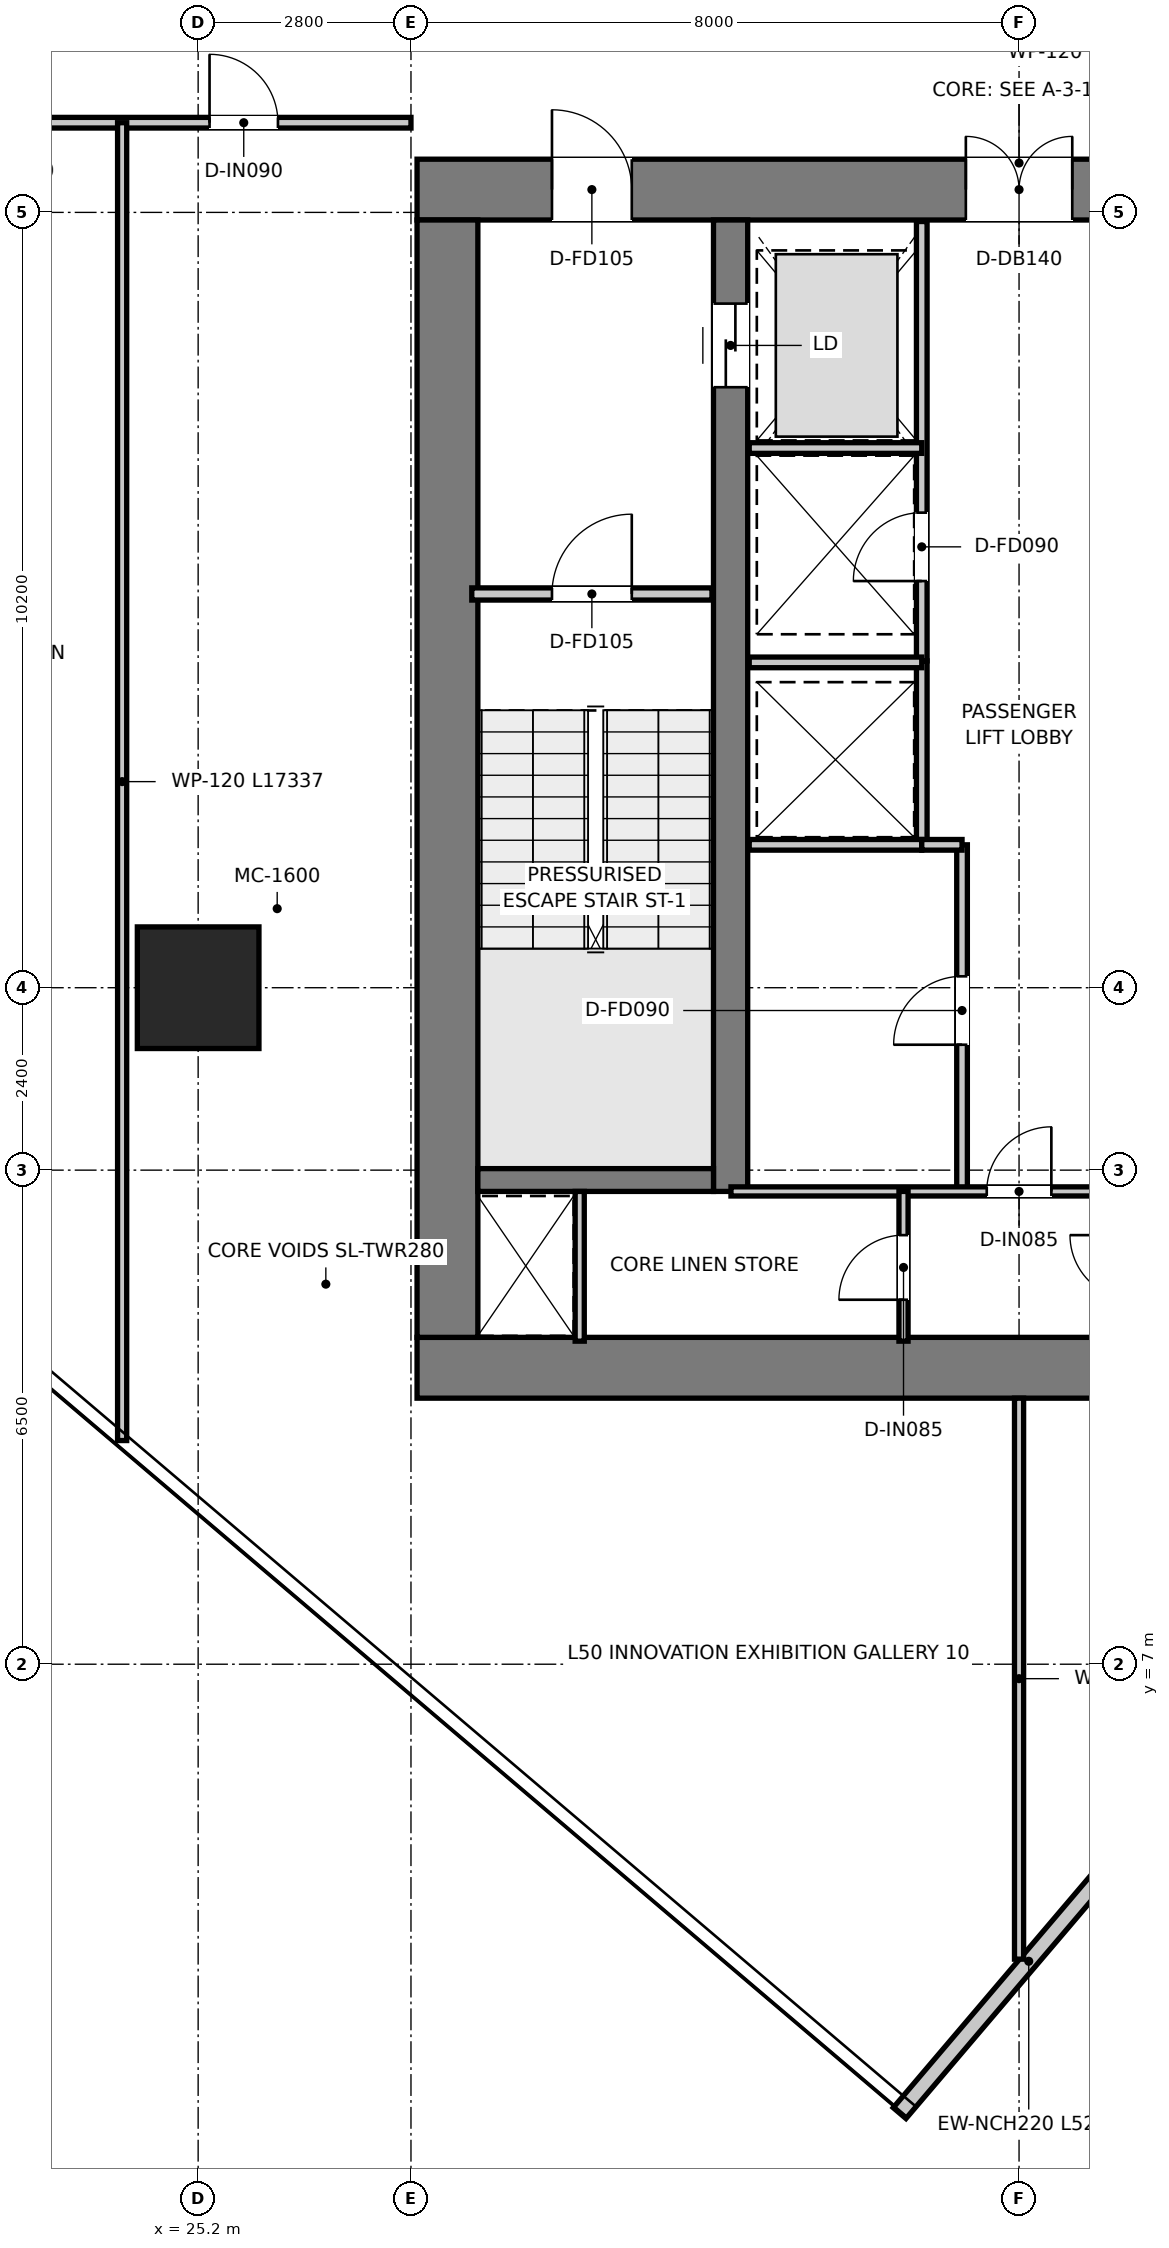
"""IFC4 building model, lengths in metres.
Left out: names, types, materials, properties, quantities, classifications, styles, units other than length and angle.
Written with IfcOpenShell. Run it as: python <this file> out.ifc"""

import sys

from ifc_helpers import new_model, si_unit, direction, frame, frame_2d, origin, origin_2d, place, context, subcontext, project, spatial, rectangle, extrude, source, transform, mapped, element, fill, save


model = new_model("IFC4")
c1 = context("Model", 3, precision=1e-05, world=origin(), true_north=direction((0.0, 1.0)))
c2 = subcontext(c1, "Body", "Model", "MODEL_VIEW")
j1 = project(units=[si_unit("LENGTHUNIT", "METRE"), si_unit("PLANEANGLEUNIT", "RADIAN")], contexts=[c1])
p1 = place(None, origin())
s1 = spatial("IfcSite", under=j1, at=p1, CompositionType="ELEMENT")
p2 = place(p1, origin())
s2 = spatial("IfcBuilding", under=s1, at=p2, CompositionType="ELEMENT")
p3 = place(p2, frame((0.0, 0.0, 207.3)))
s3 = spatial("IfcBuildingStorey", under=s2, at=p3, CompositionType="ELEMENT", Elevation=207.3)
p4 = place(p3, frame((28.08, 10.9, 0.0), z_axis=(0.0, 0.0, 1.0), x_axis=(1.0, 0.0, 0.0)))
e1 = element("IfcWall", 1, at=p4, inside=s3, PredefinedType="SHEAR", context=c2, shape_type="SweptSolid", body=[
    extrude(rectangle(XDim=15.84, YDim=0.8, at=frame_2d((7.92, 0.0))), origin(), (0.0, 0.0, 1.0), 3.95),
])
p5 = place(p3, frame((28.08, 26.4, 0.0), z_axis=(0.0, 0.0, 1.0), x_axis=(1.0, 0.0, 0.0)))
e2 = element("IfcWall", 2, at=p5, inside=s3, PredefinedType="SHEAR", context=c2, shape_type="SweptSolid", body=[
    extrude(rectangle(XDim=15.84, YDim=0.8, at=frame_2d((7.92, 0.0))), origin(), (0.0, 0.0, 1.0), 3.95),
])
p6 = place(p5, frame((7.22, 0.0, 0.0)))
e3 = element("IfcOpeningElement", 3, at=p6, cuts=e2, PredefinedType="OPENING", context=c2, shape_type="SweptSolid", body=[
    extrude(rectangle(XDim=1.4, YDim=2.2, at=frame_2d((0.7, 1.1))), frame((0.0, 0.41, 0.0), z_axis=(0.0, -1.0, 0.0), x_axis=(1.0, 0.0, 0.0)), (0.0, 0.0, 1.0), 0.82),
])
p7 = place(p5, frame((1.775, 0.0, 0.0)))
e4 = element("IfcOpeningElement", 4, at=p7, cuts=e2, PredefinedType="OPENING", context=c2, shape_type="SweptSolid", body=[
    extrude(rectangle(XDim=1.05, YDim=2.1, at=frame_2d((0.525, 1.05))), frame((0.0, 0.41, 0.0), z_axis=(0.0, -1.0, 0.0), x_axis=(1.0, 0.0, 0.0)), (0.0, 0.0, 1.0), 0.82),
])
p8 = place(p5, frame((13.015, 0.0, 0.0)))
e5 = element("IfcOpeningElement", 5, at=p8, cuts=e2, PredefinedType="OPENING", context=c2, shape_type="SweptSolid", body=[
    extrude(rectangle(XDim=1.05, YDim=2.1, at=frame_2d((0.525, 1.05))), frame((0.0, 0.41, 0.0), z_axis=(0.0, -1.0, 0.0), x_axis=(1.0, 0.0, 0.0)), (0.0, 0.0, 1.0), 0.82),
])
p9 = place(p3, frame((28.48, 11.3, 0.0), z_axis=(0.0, 0.0, 1.0), x_axis=(0.0, 1.0, 0.0)))
e6 = element("IfcWall", 6, at=p9, inside=s3, PredefinedType="SHEAR", context=c2, shape_type="SweptSolid", body=[
    extrude(rectangle(XDim=14.7, YDim=0.8, at=frame_2d((7.35, 0.0))), origin(), (0.0, 0.0, 1.0), 3.95),
])
p10 = place(p3, frame((32.205, 13.22, 0.0), z_axis=(0.0, 0.0, 1.0), x_axis=(0.0, 1.0, 0.0)))
e7 = element("IfcWall", 7, at=p10, inside=s3, PredefinedType="SHEAR", context=c2, shape_type="SweptSolid", body=[
    extrude(rectangle(XDim=12.78, YDim=0.45, at=frame_2d((6.39, 0.0))), origin(), (0.0, 0.0, 1.0), 3.95),
])
p11 = place(p10, frame((10.58, 0.0, 0.0)))
e8 = element("IfcOpeningElement", 8, at=p11, cuts=e7, PredefinedType="OPENING", context=c2, shape_type="SweptSolid", body=[
    extrude(rectangle(XDim=1.1, YDim=2.15, at=frame_2d((0.55, 1.075))), frame((0.0, 0.235, 0.0), z_axis=(0.0, -1.0, 0.0), x_axis=(1.0, 0.0, 0.0)), (0.0, 0.0, 1.0), 0.47),
])
p12 = place(p3, frame((28.88, 13.37, 0.0), z_axis=(0.0, 0.0, 1.0), x_axis=(1.0, 0.0, 0.0)))
e9 = element("IfcWall", 9, at=p12, inside=s3, PredefinedType="SHEAR", context=c2, shape_type="SweptSolid", body=[
    extrude(rectangle(XDim=3.1, YDim=0.3, at=frame_2d((1.55, 0.0))), origin(), (0.0, 0.0, 1.0), 3.95),
])
m1 = source(origin(), c2, "Body", "SweptSolid", [
    extrude(rectangle(XDim=1.6, YDim=1.6, at=origin_2d()), origin(), (0.0, 0.0, 1.0), 3.95),
])
p13 = place(p3, frame((25.2, 15.9, 0.0), z_axis=(0.0, 0.0, 1.0), x_axis=(1.0, 0.0, 0.0)))
e10 = element("IfcColumn", 10, at=p13, inside=s3, PredefinedType="USERDEFINED", context=c2, shape_type="MappedRepresentation", body=[
    mapped(m1, transform((0.0, 0.0, 0.0), x_axis=(1.0, 0.0, 0.0), y_axis=(0.0, 1.0, 0.0), z_axis=(0.0, 0.0, 1.0), scale=1.0)),
])
p14 = place(p3, frame((34.428, 1.094, 0.0), z_axis=(0.0, 0.0, 1.0), x_axis=(0.647807844474, 0.761803778304, 0.0)))
e11 = element("IfcWall", 11, at=p14, inside=s3, PredefinedType="ELEMENTEDWALL", context=c2, shape_type="SweptSolid", body=[
    extrude(rectangle(XDim=5.245, YDim=0.22, at=frame_2d((2.623, 0.0))), origin(), (0.0, 0.0, 1.0), 3.67),
])
p15 = place(p3, frame((28.8, 21.08, 0.0), z_axis=(0.0, 0.0, 1.0), x_axis=(1.0, 0.0, 0.0)))
e12 = element("IfcWall", 12, at=p15, inside=s3, PredefinedType="PARTITIONING", context=c2, shape_type="SweptSolid", body=[
    extrude(rectangle(XDim=3.16, YDim=0.16, at=frame_2d((1.58, 0.0))), origin(), (0.0, 0.0, 1.0), 3.67),
])
p16 = place(p15, frame((1.055, 0.0, 0.0)))
e13 = element("IfcOpeningElement", 13, at=p16, cuts=e12, PredefinedType="OPENING", context=c2, shape_type="SweptSolid", body=[
    extrude(rectangle(XDim=1.05, YDim=2.1, at=frame_2d((0.525, 1.05))), frame((0.0, 0.09, 0.0), z_axis=(0.0, -1.0, 0.0), x_axis=(1.0, 0.0, 0.0)), (0.0, 0.0, 1.0), 0.18),
])
p17 = place(p3, frame((34.72, 20.2, 0.0), z_axis=(0.0, 0.0, 1.0), x_axis=(0.0, 1.0, 0.0)))
e14 = element("IfcWall", 14, at=p17, inside=s3, PredefinedType="PARTITIONING", context=c2, shape_type="SweptSolid", body=[
    extrude(rectangle(XDim=5.78, YDim=0.14, at=frame_2d((2.89, 0.0))), origin(), (0.0, 0.0, 1.0), 2.67),
])
p18 = place(p17, frame((1.05, 0.0, 0.0)))
e15 = element("IfcOpeningElement", 15, at=p18, cuts=e14, PredefinedType="OPENING", context=c2, shape_type="SweptSolid", body=[
    extrude(rectangle(XDim=0.9, YDim=2.1, at=frame_2d((0.45, 1.05))), frame((0.0, 0.08, 0.0), z_axis=(0.0, -1.0, 0.0), x_axis=(1.0, 0.0, 0.0)), (0.0, 0.0, 1.0), 0.16),
])
p19 = place(p3, frame((32.45, 23.0, 0.0), z_axis=(0.0, 0.0, 1.0), x_axis=(1.0, 0.0, 0.0)))
e16 = element("IfcWall", 16, at=p19, inside=s3, PredefinedType="PARTITIONING", context=c2, shape_type="SweptSolid", body=[
    extrude(rectangle(XDim=2.27, YDim=0.14, at=frame_2d((1.135, 0.0))), origin(), (0.0, 0.0, 1.0), 2.67),
])
p20 = place(p3, frame((34.72, 17.78, 0.0), z_axis=(0.0, 0.0, 1.0), x_axis=(0.0, 1.0, 0.0)))
e17 = element("IfcWall", 17, at=p20, inside=s3, PredefinedType="PARTITIONING", context=c2, shape_type="SweptSolid", body=[
    extrude(rectangle(XDim=2.42, YDim=0.14, at=frame_2d((1.21, 0.0))), origin(), (0.0, 0.0, 1.0), 3.67),
])
for number, where, z_axis, x_axis in (
    (18, (32.45, 17.78, 0.0), (0.0, 0.0, 1.0), (1.0, 0.0, 0.0)),
    (19, (32.45, 20.18, 0.0), (0.0, 0.0, 1.0), (1.0, 0.0, 0.0)),
):
    element("IfcWall", number, at=place(p3, frame(where, z_axis=z_axis, x_axis=x_axis)), inside=s3, PredefinedType="PARTITIONING", context=c2, shape_type="SweptSolid", body=[
        extrude(rectangle(XDim=2.27, YDim=0.14, at=frame_2d((1.135, 0.0))), origin(), (0.0, 0.0, 1.0), 3.67),
    ])
p21 = place(p3, frame((35.25, 13.22, 0.0), z_axis=(0.0, 0.0, 1.0), x_axis=(0.0, 1.0, 0.0)))
e20 = element("IfcWall", 20, at=p21, inside=s3, PredefinedType="PARTITIONING", context=c2, shape_type="SweptSolid", body=[
    extrude(rectangle(XDim=4.56, YDim=0.14, at=frame_2d((2.28, 0.0))), origin(), (0.0, 0.0, 1.0), 3.67),
])
p22 = place(p21, frame((1.93, 0.0, 0.0)))
e21 = element("IfcOpeningElement", 21, at=p22, cuts=e20, PredefinedType="OPENING", context=c2, shape_type="SweptSolid", body=[
    extrude(rectangle(XDim=0.9, YDim=2.1, at=frame_2d((0.45, 1.05))), frame((0.0, 0.08, 0.0), z_axis=(0.0, -1.0, 0.0), x_axis=(1.0, 0.0, 0.0)), (0.0, 0.0, 1.0), 0.16),
])
p23 = place(p3, frame((34.72, 17.78, 0.0), z_axis=(0.0, 0.0, 1.0), x_axis=(1.0, 0.0, 0.0)))
e22 = element("IfcWall", 22, at=p23, inside=s3, PredefinedType="PARTITIONING", context=c2, shape_type="SweptSolid", body=[
    extrude(rectangle(XDim=0.53, YDim=0.14, at=frame_2d((0.265, 0.0))), origin(), (0.0, 0.0, 1.0), 3.67),
])
p24 = place(p3, frame((30.22, 11.25, 0.0), z_axis=(0.0, 0.0, 1.0), x_axis=(0.0, 1.0, 0.0)))
e23 = element("IfcWall", 23, at=p24, inside=s3, PredefinedType="PARTITIONING", context=c2, shape_type="SweptSolid", body=[
    extrude(rectangle(XDim=1.97, YDim=0.12, at=frame_2d((0.985, 0.0))), origin(), (0.0, 0.0, 1.0), 3.67),
])
p25 = place(p3, frame((32.21, 13.22, 0.0), z_axis=(0.0, 0.0, 1.0), x_axis=(1.0, 0.0, 0.0)))
e24 = element("IfcWall", 24, at=p25, inside=s3, PredefinedType="PARTITIONING", context=c2, shape_type="SweptSolid", body=[
    extrude(rectangle(XDim=7.58, YDim=0.12, at=frame_2d((3.79, 0.0))), origin(), (0.0, 0.0, 1.0), 3.67),
])
p26 = place(p25, frame((3.365, 0.0, 0.0)))
e25 = element("IfcOpeningElement", 25, at=p26, cuts=e24, PredefinedType="OPENING", context=c2, shape_type="SweptSolid", body=[
    extrude(rectangle(XDim=0.85, YDim=2.1, at=frame_2d((0.425, 1.05))), frame((0.0, 0.07, 0.0), z_axis=(0.0, -1.0, 0.0), x_axis=(1.0, 0.0, 0.0)), (0.0, 0.0, 1.0), 0.14),
])
p27 = place(p3, frame((34.48, 11.25, 0.0), z_axis=(0.0, 0.0, 1.0), x_axis=(0.0, 1.0, 0.0)))
e26 = element("IfcWall", 26, at=p27, inside=s3, PredefinedType="PARTITIONING", context=c2, shape_type="SweptSolid", body=[
    extrude(rectangle(XDim=1.97, YDim=0.12, at=frame_2d((0.985, 0.0))), origin(), (0.0, 0.0, 1.0), 3.67),
])
p28 = place(p27, frame((0.545, 0.0, 0.0)))
e27 = element("IfcOpeningElement", 27, at=p28, cuts=e26, PredefinedType="OPENING", context=c2, shape_type="SweptSolid", body=[
    extrude(rectangle(XDim=0.85, YDim=2.1, at=frame_2d((0.425, 1.05))), frame((0.0, 0.07, 0.0), z_axis=(0.0, -1.0, 0.0), x_axis=(1.0, 0.0, 0.0)), (0.0, 0.0, 1.0), 0.14),
])
p29 = place(p3, frame((11.738, 27.28, 0.0), z_axis=(0.0, 0.0, 1.0), x_axis=(1.0, 0.0, 0.0)))
e28 = element("IfcWall", 28, at=p29, inside=s3, PredefinedType="PARTITIONING", context=c2, shape_type="SweptSolid", body=[
    extrude(rectangle(XDim=16.262, YDim=0.14, at=frame_2d((8.131, 0.0))), origin(), (0.0, 0.0, 1.0), 3.03),
])
p30 = place(p29, frame((3.038, 0.0, 0.0)))
e29 = element("IfcOpeningElement", 29, at=p30, cuts=e28, PredefinedType="OPENING", context=c2, shape_type="SweptSolid", body=[
    extrude(rectangle(XDim=0.9, YDim=2.1, at=frame_2d((0.45, 1.05))), frame((0.0, 0.08, 0.0), z_axis=(0.0, -1.0, 0.0), x_axis=(1.0, 0.0, 0.0)), (0.0, 0.0, 1.0), 0.16),
])
p31 = place(p29, frame((10.612, 0.0, 0.0)))
e30 = element("IfcOpeningElement", 30, at=p31, cuts=e28, PredefinedType="OPENING", context=c2, shape_type="SweptSolid", body=[
    extrude(rectangle(XDim=0.9, YDim=2.1, at=frame_2d((0.45, 1.05))), frame((0.0, 0.08, 0.0), z_axis=(0.0, -1.0, 0.0), x_axis=(1.0, 0.0, 0.0)), (0.0, 0.0, 1.0), 0.16),
])
p32 = place(p29, frame((13.612, 0.0, 0.0)))
e31 = element("IfcOpeningElement", 31, at=p32, cuts=e28, PredefinedType="OPENING", context=c2, shape_type="SweptSolid", body=[
    extrude(rectangle(XDim=0.9, YDim=2.1, at=frame_2d((0.45, 1.05))), frame((0.0, 0.08, 0.0), z_axis=(0.0, -1.0, 0.0), x_axis=(1.0, 0.0, 0.0)), (0.0, 0.0, 1.0), 0.16),
])
p33 = place(p3, frame((36.0, 3.12, 0.0), z_axis=(0.0, 0.0, 1.0), x_axis=(0.0, 1.0, 0.0)))
e32 = element("IfcWall", 32, at=p33, inside=s3, PredefinedType="PARTITIONING", context=c2, shape_type="SweptSolid", body=[
    extrude(rectangle(XDim=7.38, YDim=0.12, at=frame_2d((3.69, 0.0))), origin(), (0.0, 0.0, 1.0), 3.67),
])
p34 = place(p3, frame((24.2, 9.943, 0.0), z_axis=(0.0, 0.0, 1.0), x_axis=(0.0, 1.0, 0.0)))
e33 = element("IfcWall", 33, at=p34, inside=s3, PredefinedType="PARTITIONING", context=c2, shape_type="SweptSolid", body=[
    extrude(rectangle(XDim=17.337, YDim=0.12, at=frame_2d((8.669, 0.0))), origin(), (0.0, 0.0, 1.0), 3.18),
])
p35 = place(p16, origin())
e34 = element("IfcDoor", 34, at=p35, inside=s3, OperationType="SINGLE_SWING_RIGHT", PredefinedType="DOOR", context=c2, shape_type="SweptSolid", body=[
    extrude(rectangle(XDim=1.05, YDim=2.1, at=frame_2d((0.525, 1.05))), frame((0.0, 0.025, 0.0), z_axis=(0.0, -1.0, 0.0), x_axis=(1.0, 0.0, 0.0)), (0.0, 0.0, 1.0), 0.05),
])
fill(e13, e34)
p36 = place(p6, origin())
e35 = element("IfcDoor", 35, at=p36, inside=s3, OperationType="DOUBLE_DOOR_SINGLE_SWING", PredefinedType="DOOR", context=c2, shape_type="SweptSolid", body=[
    extrude(rectangle(XDim=1.4, YDim=2.2, at=frame_2d((0.7, 1.1))), frame((0.0, 0.025, 0.0), z_axis=(0.0, -1.0, 0.0), x_axis=(1.0, 0.0, 0.0)), (0.0, 0.0, 1.0), 0.05),
])
fill(e3, e35)
p37 = place(p7, origin())
e36 = element("IfcDoor", 36, at=p37, inside=s3, OperationType="SINGLE_SWING_LEFT", PredefinedType="DOOR", context=c2, shape_type="SweptSolid", body=[
    extrude(rectangle(XDim=1.05, YDim=2.1, at=frame_2d((0.525, 1.05))), frame((0.0, 0.025, 0.0), z_axis=(0.0, -1.0, 0.0), x_axis=(1.0, 0.0, 0.0)), (0.0, 0.0, 1.0), 0.05),
])
fill(e4, e36)
p38 = place(p11, origin())
e37 = element("IfcDoor", 37, at=p38, inside=s3, OperationType="DOUBLE_DOOR_SLIDING", PredefinedType="DOOR", context=c2, shape_type="SweptSolid", body=[
    extrude(rectangle(XDim=1.1, YDim=2.15, at=frame_2d((0.55, 1.075))), frame((0.0, 0.025, 0.0), z_axis=(0.0, -1.0, 0.0), x_axis=(1.0, 0.0, 0.0)), (0.0, 0.0, 1.0), 0.05),
])
fill(e8, e37)
p39 = place(p18, origin())
e38 = element("IfcDoor", 38, at=p39, inside=s3, OperationType="SINGLE_SWING_LEFT", PredefinedType="DOOR", context=c2, shape_type="SweptSolid", body=[
    extrude(rectangle(XDim=0.9, YDim=2.1, at=frame_2d((0.45, 1.05))), frame((0.0, 0.025, 0.0), z_axis=(0.0, -1.0, 0.0), x_axis=(1.0, 0.0, 0.0)), (0.0, 0.0, 1.0), 0.05),
])
fill(e15, e38)
p40 = place(p22, origin())
e39 = element("IfcDoor", 39, at=p40, inside=s3, OperationType="SINGLE_SWING_LEFT", PredefinedType="DOOR", context=c2, shape_type="SweptSolid", body=[
    extrude(rectangle(XDim=0.9, YDim=2.1, at=frame_2d((0.45, 1.05))), frame((0.0, 0.025, 0.0), z_axis=(0.0, -1.0, 0.0), x_axis=(1.0, 0.0, 0.0)), (0.0, 0.0, 1.0), 0.05),
])
fill(e21, e39)
p41 = place(p26, origin())
e40 = element("IfcDoor", 40, at=p41, inside=s3, OperationType="SINGLE_SWING_RIGHT", PredefinedType="DOOR", context=c2, shape_type="SweptSolid", body=[
    extrude(rectangle(XDim=0.85, YDim=2.1, at=frame_2d((0.425, 1.05))), frame((0.0, 0.025, 0.0), z_axis=(0.0, -1.0, 0.0), x_axis=(1.0, 0.0, 0.0)), (0.0, 0.0, 1.0), 0.05),
])
fill(e25, e40)
p42 = place(p28, origin())
e41 = element("IfcDoor", 41, at=p42, inside=s3, OperationType="SINGLE_SWING_LEFT", PredefinedType="DOOR", context=c2, shape_type="SweptSolid", body=[
    extrude(rectangle(XDim=0.85, YDim=2.1, at=frame_2d((0.425, 1.05))), frame((0.0, 0.025, 0.0), z_axis=(0.0, -1.0, 0.0), x_axis=(1.0, 0.0, 0.0)), (0.0, 0.0, 1.0), 0.05),
])
fill(e27, e41)
p43 = place(p32, origin())
e42 = element("IfcDoor", 42, at=p43, inside=s3, OperationType="SINGLE_SWING_LEFT", PredefinedType="DOOR", context=c2, shape_type="SweptSolid", body=[
    extrude(rectangle(XDim=0.9, YDim=2.1, at=frame_2d((0.45, 1.05))), frame((0.0, 0.025, 0.0), z_axis=(0.0, -1.0, 0.0), x_axis=(1.0, 0.0, 0.0)), (0.0, 0.0, 1.0), 0.05),
])
fill(e31, e42)
save(model, sys.argv[1])
